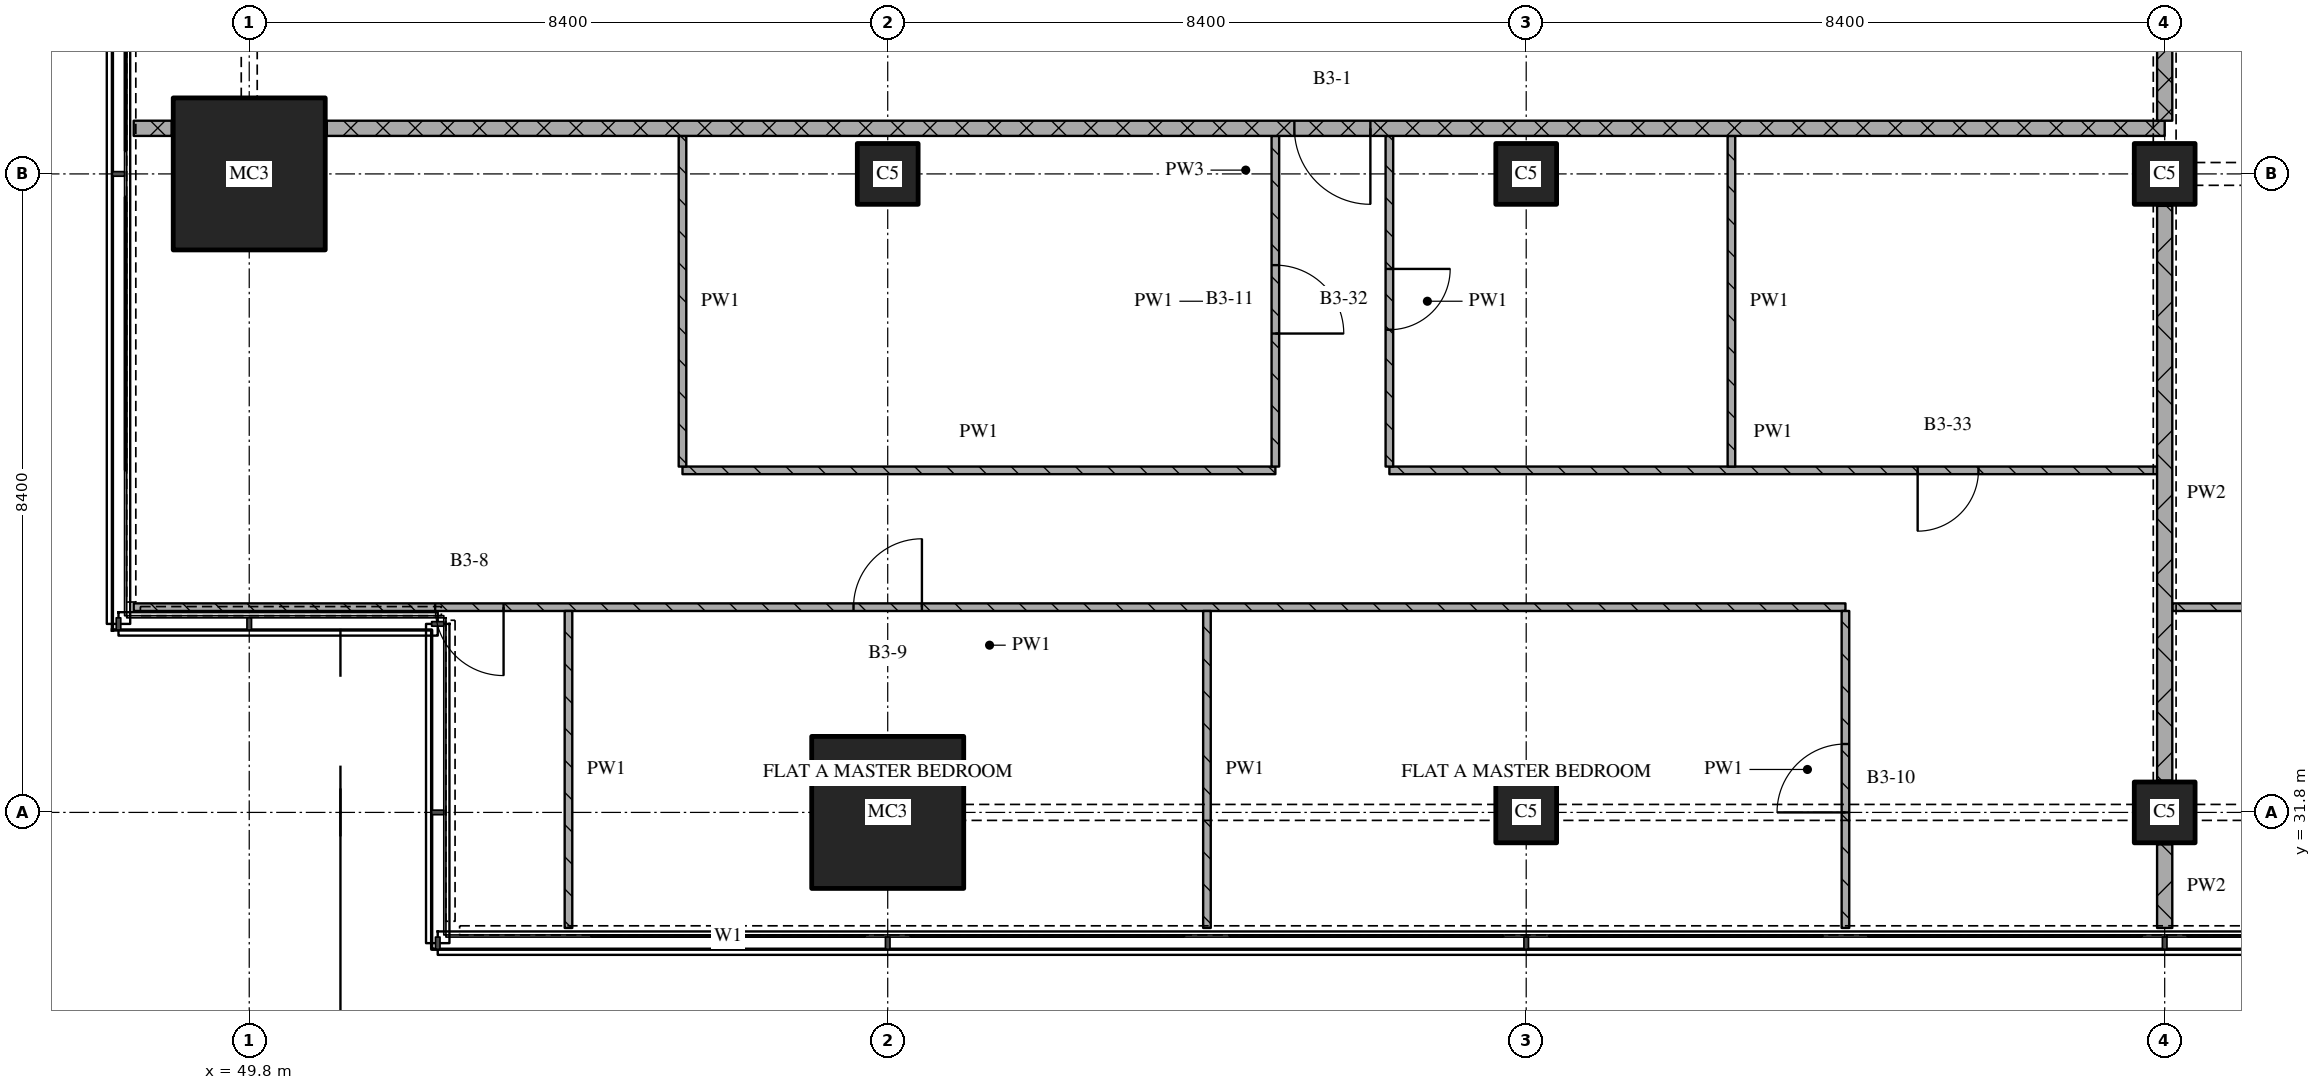
"""IFC4 building model, lengths in metres.
Left out: names, types, materials, properties, quantities, classifications, styles, units other than length and angle.
Written with IfcOpenShell. Run it as: python <this file> out.ifc"""

import sys

from ifc_helpers import new_model, si_unit, direction, frame, frame_2d, origin, origin_2d, place, context, subcontext, project, spatial, rectangle, extrude, element, fill, save


model = new_model("IFC4")
c1 = context("Model", 3, precision=1e-05, world=origin(), true_north=direction((0.0, 1.0)))
c2 = subcontext(c1, "Body", "Model", "MODEL_VIEW")
j1 = project(units=[si_unit("LENGTHUNIT", "METRE"), si_unit("PLANEANGLEUNIT", "RADIAN")], contexts=[c1])
p1 = place(None, origin())
s1 = spatial("IfcSite", under=j1, at=p1, CompositionType="ELEMENT")
p2 = place(p1, origin())
s2 = spatial("IfcBuilding", under=s1, at=p2, CompositionType="ELEMENT")
p3 = place(p2, frame((0.0, 0.0, 116.85)))
s3 = spatial("IfcBuildingStorey", under=s2, at=p3, CompositionType="ELEMENT", Elevation=116.85)
for number, where, z_axis, x_axis in (
    (1, (49.8, 40.2, 0.0), (0.0, 0.0, 1.0), (1.0, 0.0, 0.0)),
    (2, (58.2, 31.8, 0.0), (0.0, 0.0, 1.0), (1.0, 0.0, 0.0)),
):
    element("IfcColumn", number, at=place(p3, frame(where, z_axis=z_axis, x_axis=x_axis)), inside=s3, PredefinedType="COLUMN", context=c2, shape_type="SweptSolid", body=[
        extrude(rectangle(XDim=2.0, YDim=2.0, at=origin_2d()), origin(), (0.0, 0.0, 1.0), 3.6),
    ])
for number, where, z_axis, x_axis in (
    (3, (58.2, 40.2, 0.0), (0.0, 0.0, 1.0), (1.0, 0.0, 0.0)),
    (4, (66.6, 31.8, 0.0), (0.0, 0.0, 1.0), (1.0, 0.0, 0.0)),
    (5, (66.6, 40.2, 0.0), (0.0, 0.0, 1.0), (1.0, 0.0, 0.0)),
    (6, (75.0, 31.8, 0.0), (0.0, 0.0, 1.0), (1.0, 0.0, 0.0)),
    (7, (75.0, 40.2, 0.0), (0.0, 0.0, 1.0), (1.0, 0.0, 0.0)),
):
    element("IfcColumn", number, at=place(p3, frame(where, z_axis=z_axis, x_axis=x_axis)), inside=s3, PredefinedType="COLUMN", context=c2, shape_type="SweptSolid", body=[
        extrude(rectangle(XDim=0.8, YDim=0.8, at=origin_2d()), origin(), (0.0, 0.0, 1.0), 3.6),
    ])
p4 = place(p3, frame((70.8, 34.5, 0.0), z_axis=(0.0, 0.0, 1.0), x_axis=(-1.0, 0.0, 0.0)))
e8 = element("IfcWall", 8, at=p4, inside=s3, PredefinedType="PARTITIONING", context=c2, shape_type="SweptSolid", body=[
    extrude(rectangle(XDim=22.52, YDim=0.1, at=frame_2d((11.26, 0.0))), origin(), (0.0, 0.0, 1.0), 3.32),
])
p5 = place(p4, frame((12.15, 0.0, 0.0)))
e9 = element("IfcOpeningElement", 9, at=p5, cuts=e8, PredefinedType="OPENING", context=c2, shape_type="SweptSolid", body=[
    extrude(rectangle(XDim=0.9, YDim=2.1, at=frame_2d((0.45, 1.05))), frame((0.0, 0.06, 0.0), z_axis=(0.0, -1.0, 0.0), x_axis=(1.0, 0.0, 0.0)), (0.0, 0.0, 1.0), 0.12),
])
p6 = place(p4, frame((17.654, 0.0, 0.0)))
e10 = element("IfcOpeningElement", 10, at=p6, cuts=e8, PredefinedType="OPENING", context=c2, shape_type="SweptSolid", body=[
    extrude(rectangle(XDim=0.9, YDim=2.1, at=frame_2d((0.45, 1.05))), frame((0.0, 0.06, 0.0), z_axis=(0.0, -1.0, 0.0), x_axis=(1.0, 0.0, 0.0)), (0.0, 0.0, 1.0), 0.12),
])
p7 = place(p3, frame((96.0, 34.5, 0.0), z_axis=(0.0, 0.0, 1.0), x_axis=(-1.0, 0.0, 0.0)))
e11 = element("IfcWall", 11, at=p7, inside=s3, PredefinedType="PARTITIONING", context=c2, shape_type="SweptSolid", body=[
    extrude(rectangle(XDim=20.9, YDim=0.1, at=frame_2d((10.45, 0.0))), origin(), (0.0, 0.0, 1.0), 3.32),
])
p8 = place(p7, frame((10.05, 0.0, 0.0)))
e12 = element("IfcOpeningElement", 12, at=p8, cuts=e11, PredefinedType="OPENING", context=c2, shape_type="SweptSolid", body=[
    extrude(rectangle(XDim=0.9, YDim=2.1, at=frame_2d((0.45, 1.05))), frame((0.0, 0.06, 0.0), z_axis=(0.0, -1.0, 0.0), x_axis=(1.0, 0.0, 0.0)), (0.0, 0.0, 1.0), 0.12),
])
p9 = place(p7, frame((16.35, 0.0, 0.0)))
e13 = element("IfcOpeningElement", 13, at=p9, cuts=e11, PredefinedType="OPENING", context=c2, shape_type="SweptSolid", body=[
    extrude(rectangle(XDim=0.9, YDim=2.1, at=frame_2d((0.45, 1.05))), frame((0.0, 0.06, 0.0), z_axis=(0.0, -1.0, 0.0), x_axis=(1.0, 0.0, 0.0)), (0.0, 0.0, 1.0), 0.12),
])
p10 = place(p3, frame((55.5, 36.3, 0.0), z_axis=(0.0, 0.0, 1.0), x_axis=(1.0, 0.0, 0.0)))
e14 = element("IfcWall", 14, at=p10, inside=s3, PredefinedType="PARTITIONING", context=c2, shape_type="SweptSolid", body=[
    extrude(rectangle(XDim=7.8, YDim=0.1, at=frame_2d((3.9, 0.0))), origin(), (0.0, 0.0, 1.0), 3.32),
])
p11 = place(p3, frame((64.8, 36.3, 0.0), z_axis=(0.0, 0.0, 1.0), x_axis=(1.0, 0.0, 0.0)))
e15 = element("IfcWall", 15, at=p11, inside=s3, PredefinedType="PARTITIONING", context=c2, shape_type="SweptSolid", body=[
    extrude(rectangle(XDim=10.1, YDim=0.1, at=frame_2d((5.05, 0.0))), origin(), (0.0, 0.0, 1.0), 3.32),
])
p12 = place(p11, frame((6.95, 0.0, 0.0)))
e16 = element("IfcOpeningElement", 16, at=p12, cuts=e15, PredefinedType="OPENING", context=c2, shape_type="SweptSolid", body=[
    extrude(rectangle(XDim=0.8, YDim=2.1, at=frame_2d((0.4, 1.05))), frame((0.0, 0.06, 0.0), z_axis=(0.0, -1.0, 0.0), x_axis=(1.0, 0.0, 0.0)), (0.0, 0.0, 1.0), 0.12),
])
p13 = place(p3, frame((48.28, 40.8, 0.0), z_axis=(0.0, 0.0, 1.0), x_axis=(1.0, 0.0, 0.0)))
e17 = element("IfcWall", 17, at=p13, inside=s3, PredefinedType="PARTITIONING", context=c2, shape_type="SweptSolid", body=[
    extrude(rectangle(XDim=0.5, YDim=0.2, at=frame_2d((0.25, 0.0))), origin(), (0.0, 0.0, 1.0), 3.32),
])
p14 = place(p3, frame((75.0, 40.8, 0.0), z_axis=(0.0, 0.0, 1.0), x_axis=(-1.0, 0.0, 0.0)))
e18 = element("IfcWall", 18, at=p14, inside=s3, PredefinedType="PARTITIONING", context=c2, shape_type="SweptSolid", body=[
    extrude(rectangle(XDim=24.18, YDim=0.2, at=frame_2d((12.09, 0.0))), origin(), (0.0, 0.0, 1.0), 3.32),
])
p15 = place(p14, frame((10.45, 0.0, 0.0)))
e19 = element("IfcOpeningElement", 19, at=p15, cuts=e18, PredefinedType="OPENING", context=c2, shape_type="SweptSolid", body=[
    extrude(rectangle(XDim=1.0, YDim=2.1, at=frame_2d((0.5, 1.05))), frame((0.0, 0.11, 0.0), z_axis=(0.0, -1.0, 0.0), x_axis=(1.0, 0.0, 0.0)), (0.0, 0.0, 1.0), 0.22),
])
p16 = place(p3, frame((54.0, 34.45, 0.0), z_axis=(0.0, 0.0, 1.0), x_axis=(0.0, -1.0, 0.0)))
e20 = element("IfcWall", 20, at=p16, inside=s3, PredefinedType="PARTITIONING", context=c2, shape_type="SweptSolid", body=[
    extrude(rectangle(XDim=4.17, YDim=0.1, at=frame_2d((2.085, 0.0))), origin(), (0.0, 0.0, 1.0), 3.32),
])
p17 = place(p3, frame((55.5, 40.7, 0.0), z_axis=(0.0, 0.0, 1.0), x_axis=(0.0, -1.0, 0.0)))
e21 = element("IfcWall", 21, at=p17, inside=s3, PredefinedType="PARTITIONING", context=c2, shape_type="SweptSolid", body=[
    extrude(rectangle(XDim=4.35, YDim=0.1, at=frame_2d((2.175, 0.0))), origin(), (0.0, 0.0, 1.0), 3.32),
])
p18 = place(p3, frame((62.4, 34.45, 0.0), z_axis=(0.0, 0.0, 1.0), x_axis=(0.0, -1.0, 0.0)))
e22 = element("IfcWall", 22, at=p18, inside=s3, PredefinedType="PARTITIONING", context=c2, shape_type="SweptSolid", body=[
    extrude(rectangle(XDim=4.17, YDim=0.1, at=frame_2d((2.085, 0.0))), origin(), (0.0, 0.0, 1.0), 3.32),
])
p19 = place(p3, frame((63.3, 36.35, 0.0), z_axis=(0.0, 0.0, 1.0), x_axis=(0.0, 1.0, 0.0)))
e23 = element("IfcWall", 23, at=p19, inside=s3, PredefinedType="PARTITIONING", context=c2, shape_type="SweptSolid", body=[
    extrude(rectangle(XDim=4.35, YDim=0.1, at=frame_2d((2.175, 0.0))), origin(), (0.0, 0.0, 1.0), 3.32),
])
p20 = place(p19, frame((1.75, 0.0, 0.0)))
e24 = element("IfcOpeningElement", 24, at=p20, cuts=e23, PredefinedType="OPENING", context=c2, shape_type="SweptSolid", body=[
    extrude(rectangle(XDim=0.9, YDim=2.1, at=frame_2d((0.45, 1.05))), frame((0.0, 0.06, 0.0), z_axis=(0.0, -1.0, 0.0), x_axis=(1.0, 0.0, 0.0)), (0.0, 0.0, 1.0), 0.12),
])
p21 = place(p3, frame((64.8, 40.7, 0.0), z_axis=(0.0, 0.0, 1.0), x_axis=(0.0, -1.0, 0.0)))
e25 = element("IfcWall", 25, at=p21, inside=s3, PredefinedType="PARTITIONING", context=c2, shape_type="SweptSolid", body=[
    extrude(rectangle(XDim=4.35, YDim=0.1, at=frame_2d((2.175, 0.0))), origin(), (0.0, 0.0, 1.0), 3.32),
])
p22 = place(p21, frame((1.75, 0.0, 0.0)))
e26 = element("IfcOpeningElement", 26, at=p22, cuts=e25, PredefinedType="OPENING", context=c2, shape_type="SweptSolid", body=[
    extrude(rectangle(XDim=0.8, YDim=2.1, at=frame_2d((0.4, 1.05))), frame((0.0, 0.06, 0.0), z_axis=(0.0, -1.0, 0.0), x_axis=(1.0, 0.0, 0.0)), (0.0, 0.0, 1.0), 0.12),
])
p23 = place(p3, frame((69.3, 40.7, 0.0), z_axis=(0.0, 0.0, 1.0), x_axis=(0.0, -1.0, 0.0)))
e27 = element("IfcWall", 27, at=p23, inside=s3, PredefinedType="PARTITIONING", context=c2, shape_type="SweptSolid", body=[
    extrude(rectangle(XDim=4.35, YDim=0.1, at=frame_2d((2.175, 0.0))), origin(), (0.0, 0.0, 1.0), 3.32),
])
p24 = place(p3, frame((70.8, 30.28, 0.0), z_axis=(0.0, 0.0, 1.0), x_axis=(0.0, 1.0, 0.0)))
e28 = element("IfcWall", 28, at=p24, inside=s3, PredefinedType="PARTITIONING", context=c2, shape_type="SweptSolid", body=[
    extrude(rectangle(XDim=4.17, YDim=0.1, at=frame_2d((2.085, 0.0))), origin(), (0.0, 0.0, 1.0), 3.32),
])
p25 = place(p24, frame((1.52, 0.0, 0.0)))
e29 = element("IfcOpeningElement", 29, at=p25, cuts=e28, PredefinedType="OPENING", context=c2, shape_type="SweptSolid", body=[
    extrude(rectangle(XDim=0.9, YDim=2.1, at=frame_2d((0.45, 1.05))), frame((0.0, 0.06, 0.0), z_axis=(0.0, -1.0, 0.0), x_axis=(1.0, 0.0, 0.0)), (0.0, 0.0, 1.0), 0.12),
])
p26 = place(p3, frame((75.0, 43.1, 0.0), z_axis=(0.0, 0.0, 1.0), x_axis=(0.0, -1.0, 0.0)))
e30 = element("IfcWall", 30, at=p26, inside=s3, PredefinedType="PARTITIONING", context=c2, shape_type="SweptSolid", body=[
    extrude(rectangle(XDim=2.2, YDim=0.2, at=frame_2d((1.1, 0.0))), origin(), (0.0, 0.0, 1.0), 2.43),
])
p27 = place(p3, frame((75.0, 31.38, 0.0), z_axis=(0.0, 0.0, 1.0), x_axis=(0.0, -1.0, 0.0)))
e31 = element("IfcWall", 31, at=p27, inside=s3, PredefinedType="PARTITIONING", context=c2, shape_type="SweptSolid", body=[
    extrude(rectangle(XDim=1.1, YDim=0.2, at=frame_2d((0.55, 0.0))), origin(), (0.0, 0.0, 1.0), 3.32),
])
p28 = place(p3, frame((75.0, 39.78, 0.0), z_axis=(0.0, 0.0, 1.0), x_axis=(0.0, -1.0, 0.0)))
e32 = element("IfcWall", 32, at=p28, inside=s3, PredefinedType="PARTITIONING", context=c2, shape_type="SweptSolid", body=[
    extrude(rectangle(XDim=7.56, YDim=0.2, at=frame_2d((3.78, 0.0))), origin(), (0.0, 0.0, 1.0), 2.83),
])
p29 = place(p5, origin())
e33 = element("IfcDoor", 33, at=p29, inside=s3, OperationType="SINGLE_SWING_RIGHT", PredefinedType="DOOR", context=c2, shape_type="SweptSolid", body=[
    extrude(rectangle(XDim=0.9, YDim=2.1, at=frame_2d((0.45, 1.05))), frame((0.0, 0.025, 0.0), z_axis=(0.0, -1.0, 0.0), x_axis=(1.0, 0.0, 0.0)), (0.0, 0.0, 1.0), 0.05),
])
fill(e9, e33)
p30 = place(p6, origin())
e34 = element("IfcDoor", 34, at=p30, inside=s3, OperationType="SINGLE_SWING_LEFT", PredefinedType="DOOR", context=c2, shape_type="SweptSolid", body=[
    extrude(rectangle(XDim=0.9, YDim=2.1, at=frame_2d((0.45, 1.05))), frame((0.0, 0.025, 0.0), z_axis=(0.0, -1.0, 0.0), x_axis=(1.0, 0.0, 0.0)), (0.0, 0.0, 1.0), 0.05),
])
fill(e10, e34)
p31 = place(p12, origin())
e35 = element("IfcDoor", 35, at=p31, inside=s3, OperationType="SINGLE_SWING_RIGHT", PredefinedType="DOOR", context=c2, shape_type="SweptSolid", body=[
    extrude(rectangle(XDim=0.8, YDim=2.1, at=frame_2d((0.4, 1.05))), frame((0.0, 0.025, 0.0), z_axis=(0.0, -1.0, 0.0), x_axis=(1.0, 0.0, 0.0)), (0.0, 0.0, 1.0), 0.05),
])
fill(e16, e35)
p32 = place(p15, origin())
e36 = element("IfcDoor", 36, at=p32, inside=s3, OperationType="SINGLE_SWING_LEFT", PredefinedType="DOOR", context=c2, shape_type="SweptSolid", body=[
    extrude(rectangle(XDim=1.0, YDim=2.1, at=frame_2d((0.5, 1.05))), frame((0.0, 0.025, 0.0), z_axis=(0.0, -1.0, 0.0), x_axis=(1.0, 0.0, 0.0)), (0.0, 0.0, 1.0), 0.05),
])
fill(e19, e36)
p33 = place(p20, origin())
e37 = element("IfcDoor", 37, at=p33, inside=s3, OperationType="SINGLE_SWING_RIGHT", PredefinedType="DOOR", context=c2, shape_type="SweptSolid", body=[
    extrude(rectangle(XDim=0.9, YDim=2.1, at=frame_2d((0.45, 1.05))), frame((0.0, 0.025, 0.0), z_axis=(0.0, -1.0, 0.0), x_axis=(1.0, 0.0, 0.0)), (0.0, 0.0, 1.0), 0.05),
])
fill(e24, e37)
p34 = place(p22, origin())
e38 = element("IfcDoor", 38, at=p34, inside=s3, OperationType="SINGLE_SWING_LEFT", PredefinedType="DOOR", context=c2, shape_type="SweptSolid", body=[
    extrude(rectangle(XDim=0.8, YDim=2.1, at=frame_2d((0.4, 1.05))), frame((0.0, 0.025, 0.0), z_axis=(0.0, -1.0, 0.0), x_axis=(1.0, 0.0, 0.0)), (0.0, 0.0, 1.0), 0.05),
])
fill(e26, e38)
p35 = place(p25, origin())
e39 = element("IfcDoor", 39, at=p35, inside=s3, OperationType="SINGLE_SWING_LEFT", PredefinedType="DOOR", context=c2, shape_type="SweptSolid", body=[
    extrude(rectangle(XDim=0.9, YDim=2.1, at=frame_2d((0.45, 1.05))), frame((0.0, 0.025, 0.0), z_axis=(0.0, -1.0, 0.0), x_axis=(1.0, 0.0, 0.0)), (0.0, 0.0, 1.0), 0.05),
])
fill(e29, e39)
save(model, sys.argv[1])
